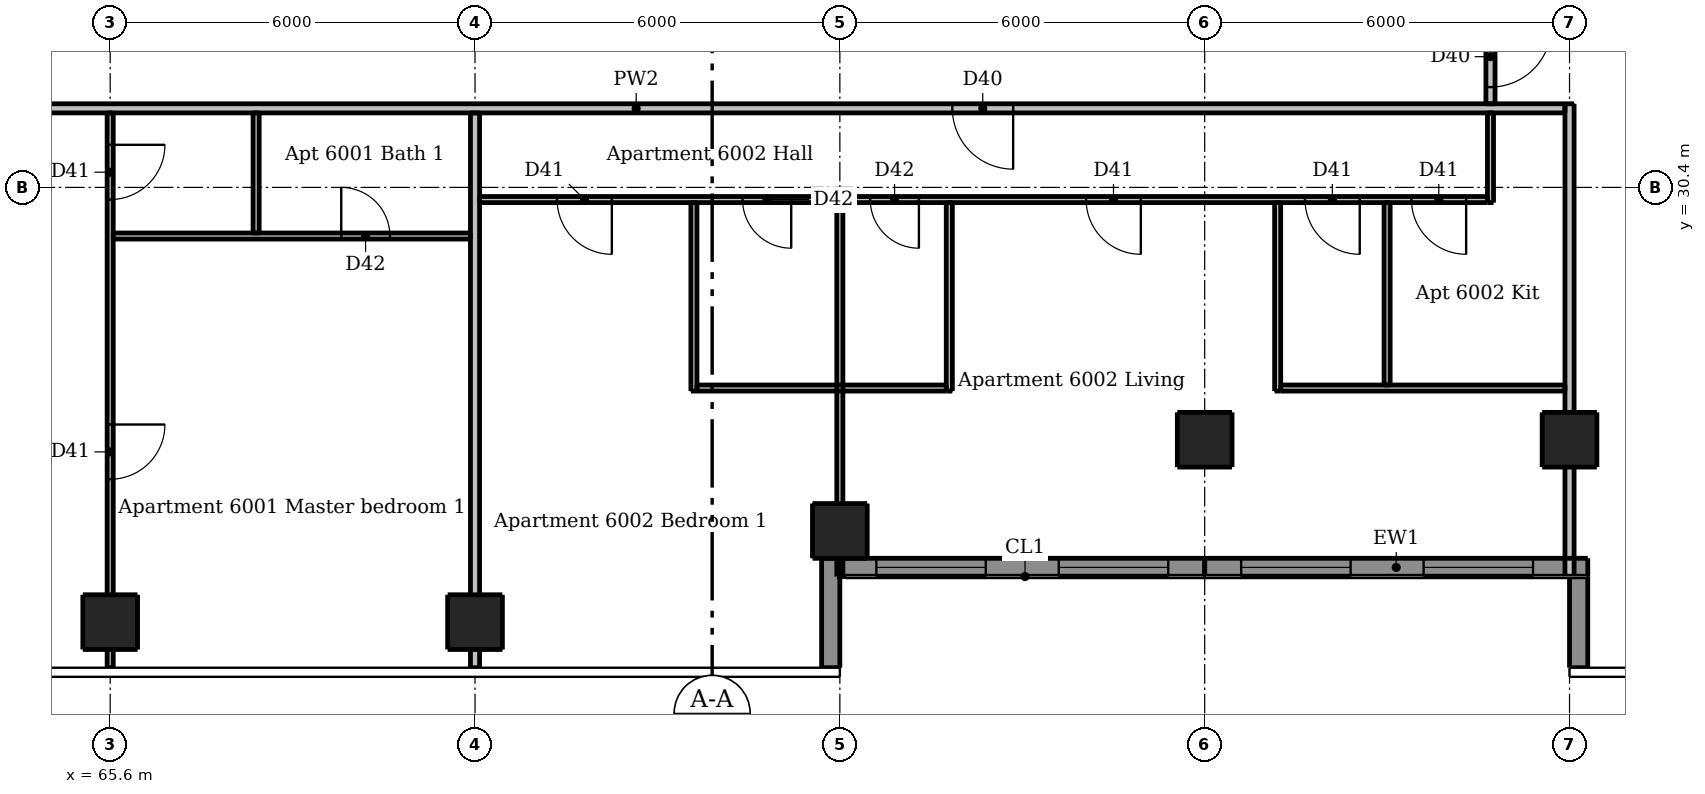
"""IFC4 building model, lengths in metres.
Left out: names, types, materials, properties, quantities, classifications, styles, units other than length and angle.
Written with IfcOpenShell. Run it as: python <this file> out.ifc"""

import sys

from ifc_helpers import new_model, si_unit, direction, frame, frame_2d, origin, origin_2d, place, context, subcontext, project, spatial, rectangle, extrude, element, fill, save


model = new_model("IFC4")
c1 = context("Model", 3, precision=1e-05, world=origin(), true_north=direction((0.0, 1.0)))
c2 = subcontext(c1, "Body", "Model", "MODEL_VIEW")
j1 = project(units=[si_unit("LENGTHUNIT", "METRE"), si_unit("PLANEANGLEUNIT", "RADIAN")], contexts=[c1])
p1 = place(None, origin())
s1 = spatial("IfcSite", under=j1, at=p1, CompositionType="ELEMENT")
p2 = place(p1, origin())
s2 = spatial("IfcBuilding", under=s1, at=p2, CompositionType="ELEMENT")
p3 = place(p2, frame((0.0, 0.0, 223.3)))
s3 = spatial("IfcBuildingStorey", under=s2, at=p3, CompositionType="ELEMENT", Elevation=223.3)
for number, where, z_axis, x_axis in (
    (1, (65.6, 23.25, 0.0), (0.0, 0.0, 1.0), (1.0, 0.0, 0.0)),
    (2, (71.6, 23.25, 0.0), (0.0, 0.0, 1.0), (1.0, 0.0, 0.0)),
    (3, (77.6, 24.75, 0.0), (0.0, 0.0, 1.0), (1.0, 0.0, 0.0)),
    (4, (83.6, 26.25, 0.0), (0.0, 0.0, 1.0), (1.0, 0.0, 0.0)),
    (5, (89.6, 26.25, 0.0), (0.0, 0.0, 1.0), (1.0, 0.0, 0.0)),
):
    element("IfcColumn", number, at=place(p3, frame(where, z_axis=z_axis, x_axis=x_axis)), inside=s3, PredefinedType="COLUMN", context=c2, shape_type="SweptSolid", body=[
        extrude(rectangle(XDim=0.9, YDim=0.9, at=origin_2d()), origin(), (0.0, 0.0, 1.0), 3.05),
    ])
p4 = place(p3, frame((77.45, 22.5, 0.0), z_axis=(0.0, 0.0, 1.0), x_axis=(0.0, 1.0, 0.0)))
e6 = element("IfcWall", 6, at=p4, inside=s3, PredefinedType="SOLIDWALL", context=c2, shape_type="SweptSolid", body=[
    extrude(rectangle(XDim=1.8, YDim=0.3, at=frame_2d((0.9, 0.0))), origin(), (0.0, 0.0, 1.0), 3.05),
])
p5 = place(p3, frame((89.75, 24.0, 0.0), z_axis=(0.0, 0.0, 1.0), x_axis=(0.0, -1.0, 0.0)))
e7 = element("IfcWall", 7, at=p5, inside=s3, PredefinedType="SOLIDWALL", context=c2, shape_type="SweptSolid", body=[
    extrude(rectangle(XDim=1.5, YDim=0.3, at=frame_2d((0.75, 0.0))), origin(), (0.0, 0.0, 1.0), 3.05),
])
p6 = place(p3, frame((77.6, 24.15, 0.0), z_axis=(0.0, 0.0, 1.0), x_axis=(1.0, 0.0, 0.0)))
e8 = element("IfcWall", 8, at=p6, inside=s3, PredefinedType="SOLIDWALL", context=c2, shape_type="SweptSolid", body=[
    extrude(rectangle(XDim=6.0, YDim=0.3, at=frame_2d((3.0, 0.0))), origin(), (0.0, 0.0, 1.0), 3.05),
])
p7 = place(p6, frame((0.6, 0.0, 0.15)))
e9 = element("IfcOpeningElement", 9, at=p7, cuts=e8, PredefinedType="OPENING", context=c2, shape_type="SweptSolid", body=[
    extrude(rectangle(XDim=1.8, YDim=2.1, at=frame_2d((0.9, 1.05))), frame((0.0, 0.16, 0.0), z_axis=(0.0, -1.0, 0.0), x_axis=(1.0, 0.0, 0.0)), (0.0, 0.0, 1.0), 0.32),
])
p8 = place(p6, frame((3.6, 0.0, 0.15)))
e10 = element("IfcOpeningElement", 10, at=p8, cuts=e8, PredefinedType="OPENING", context=c2, shape_type="SweptSolid", body=[
    extrude(rectangle(XDim=1.8, YDim=2.1, at=frame_2d((0.9, 1.05))), frame((0.0, 0.16, 0.0), z_axis=(0.0, -1.0, 0.0), x_axis=(1.0, 0.0, 0.0)), (0.0, 0.0, 1.0), 0.32),
])
p9 = place(p3, frame((83.6, 24.15, 0.0), z_axis=(0.0, 0.0, 1.0), x_axis=(1.0, 0.0, 0.0)))
e11 = element("IfcWall", 11, at=p9, inside=s3, PredefinedType="SOLIDWALL", context=c2, shape_type="SweptSolid", body=[
    extrude(rectangle(XDim=6.3, YDim=0.3, at=frame_2d((3.15, 0.0))), origin(), (0.0, 0.0, 1.0), 3.05),
])
p10 = place(p9, frame((0.6, 0.0, 0.15)))
e12 = element("IfcOpeningElement", 12, at=p10, cuts=e11, PredefinedType="OPENING", context=c2, shape_type="SweptSolid", body=[
    extrude(rectangle(XDim=1.8, YDim=2.1, at=frame_2d((0.9, 1.05))), frame((0.0, 0.16, 0.0), z_axis=(0.0, -1.0, 0.0), x_axis=(1.0, 0.0, 0.0)), (0.0, 0.0, 1.0), 0.32),
])
p11 = place(p9, frame((3.6, 0.0, 0.15)))
e13 = element("IfcOpeningElement", 13, at=p11, cuts=e11, PredefinedType="OPENING", context=c2, shape_type="SweptSolid", body=[
    extrude(rectangle(XDim=1.8, YDim=2.1, at=frame_2d((0.9, 1.05))), frame((0.0, 0.16, 0.0), z_axis=(0.0, -1.0, 0.0), x_axis=(1.0, 0.0, 0.0)), (0.0, 0.0, 1.0), 0.32),
])
p12 = place(p3, frame((65.6, 31.625, 0.0), z_axis=(0.0, 0.0, 1.0), x_axis=(0.0, -1.0, 0.0)))
e14 = element("IfcWall", 14, at=p12, inside=s3, PredefinedType="PARTITIONING", context=c2, shape_type="SweptSolid", body=[
    extrude(rectangle(XDim=9.125, YDim=0.1, at=frame_2d((4.562, 0.0))), origin(), (0.0, 0.0, 1.0), 2.516),
])
p13 = place(p12, frame((0.525, 0.0, 0.0)))
e15 = element("IfcOpeningElement", 15, at=p13, cuts=e14, PredefinedType="OPENING", context=c2, shape_type="SweptSolid", body=[
    extrude(rectangle(XDim=0.9, YDim=2.1, at=frame_2d((0.45, 1.05))), frame((0.0, 0.06, 0.0), z_axis=(0.0, -1.0, 0.0), x_axis=(1.0, 0.0, 0.0)), (0.0, 0.0, 1.0), 0.12),
])
p14 = place(p12, frame((5.125, 0.0, 0.0)))
e16 = element("IfcOpeningElement", 16, at=p14, cuts=e14, PredefinedType="OPENING", context=c2, shape_type="SweptSolid", body=[
    extrude(rectangle(XDim=0.9, YDim=2.1, at=frame_2d((0.45, 1.05))), frame((0.0, 0.06, 0.0), z_axis=(0.0, -1.0, 0.0), x_axis=(1.0, 0.0, 0.0)), (0.0, 0.0, 1.0), 0.12),
])
p15 = place(p3, frame((68.0, 29.65, 0.0), z_axis=(0.0, 0.0, 1.0), x_axis=(0.0, 1.0, 0.0)))
e17 = element("IfcWall", 17, at=p15, inside=s3, PredefinedType="PARTITIONING", context=c2, shape_type="SweptSolid", body=[
    extrude(rectangle(XDim=1.975, YDim=0.1, at=frame_2d((0.988, 0.0))), origin(), (0.0, 0.0, 1.0), 3.05),
])
p16 = place(p3, frame((75.2, 27.05, 0.0), z_axis=(0.0, 0.0, 1.0), x_axis=(0.0, 1.0, 0.0)))
e18 = element("IfcWall", 18, at=p16, inside=s3, PredefinedType="PARTITIONING", context=c2, shape_type="SweptSolid", body=[
    extrude(rectangle(XDim=3.1, YDim=0.1, at=frame_2d((1.55, 0.0))), origin(), (0.0, 0.0, 1.0), 3.05),
])
p17 = place(p3, frame((77.6, 24.0, 0.0), z_axis=(0.0, 0.0, 1.0), x_axis=(0.0, 1.0, 0.0)))
e19 = element("IfcWall", 19, at=p17, inside=s3, PredefinedType="PARTITIONING", context=c2, shape_type="SweptSolid", body=[
    extrude(rectangle(XDim=6.15, YDim=0.1, at=frame_2d((3.075, 0.0))), origin(), (0.0, 0.0, 1.0), 2.59),
])
for number, where, z_axis, x_axis in (
    (20, (79.4, 27.05, 0.0), (0.0, 0.0, 1.0), (0.0, 1.0, 0.0)),
    (21, (84.8, 27.05, 0.0), (0.0, 0.0, 1.0), (0.0, 1.0, 0.0)),
):
    element("IfcWall", number, at=place(p3, frame(where, z_axis=z_axis, x_axis=x_axis)), inside=s3, PredefinedType="PARTITIONING", context=c2, shape_type="SweptSolid", body=[
        extrude(rectangle(XDim=3.1, YDim=0.1, at=frame_2d((1.55, 0.0))), origin(), (0.0, 0.0, 1.0), 3.05),
    ])
p18 = place(p3, frame((86.6, 27.15, 0.0), z_axis=(0.0, 0.0, 1.0), x_axis=(0.0, 1.0, 0.0)))
e22 = element("IfcWall", 22, at=p18, inside=s3, PredefinedType="PARTITIONING", context=c2, shape_type="SweptSolid", body=[
    extrude(rectangle(XDim=3.0, YDim=0.1, at=frame_2d((1.5, 0.0))), origin(), (0.0, 0.0, 1.0), 3.05),
])
p19 = place(p3, frame((88.3, 30.15, 0.0), z_axis=(0.0, 0.0, 1.0), x_axis=(0.0, 1.0, 0.0)))
e23 = element("IfcWall", 23, at=p19, inside=s3, PredefinedType="PARTITIONING", context=c2, shape_type="SweptSolid", body=[
    extrude(rectangle(XDim=1.475, YDim=0.1, at=frame_2d((0.738, 0.0))), origin(), (0.0, 0.0, 1.0), 3.05),
])
p20 = place(p3, frame((88.25, 30.2, 0.0), z_axis=(0.0, 0.0, 1.0), x_axis=(-1.0, 0.0, 0.0)))
e24 = element("IfcWall", 24, at=p20, inside=s3, PredefinedType="PARTITIONING", context=c2, shape_type="SweptSolid", body=[
    extrude(rectangle(XDim=16.575, YDim=0.1, at=frame_2d((8.288, 0.0))), origin(), (0.0, 0.0, 1.0), 3.05),
])
p21 = place(p20, frame((5.7, 0.0, 0.0)))
e25 = element("IfcOpeningElement", 25, at=p21, cuts=e24, PredefinedType="OPENING", context=c2, shape_type="SweptSolid", body=[
    extrude(rectangle(XDim=0.9, YDim=2.1, at=frame_2d((0.45, 1.05))), frame((0.0, 0.06, 0.0), z_axis=(0.0, -1.0, 0.0), x_axis=(1.0, 0.0, 0.0)), (0.0, 0.0, 1.0), 0.12),
])
p22 = place(p20, frame((0.35, 0.0, 0.0)))
e26 = element("IfcOpeningElement", 26, at=p22, cuts=e24, PredefinedType="OPENING", context=c2, shape_type="SweptSolid", body=[
    extrude(rectangle(XDim=0.9, YDim=2.1, at=frame_2d((0.45, 1.05))), frame((0.0, 0.06, 0.0), z_axis=(0.0, -1.0, 0.0), x_axis=(1.0, 0.0, 0.0)), (0.0, 0.0, 1.0), 0.12),
])
p23 = place(p20, frame((2.1, 0.0, 0.0)))
e27 = element("IfcOpeningElement", 27, at=p23, cuts=e24, PredefinedType="OPENING", context=c2, shape_type="SweptSolid", body=[
    extrude(rectangle(XDim=0.9, YDim=2.1, at=frame_2d((0.45, 1.05))), frame((0.0, 0.06, 0.0), z_axis=(0.0, -1.0, 0.0), x_axis=(1.0, 0.0, 0.0)), (0.0, 0.0, 1.0), 0.12),
])
p24 = place(p20, frame((9.35, 0.0, 0.0)))
e28 = element("IfcOpeningElement", 28, at=p24, cuts=e24, PredefinedType="OPENING", context=c2, shape_type="SweptSolid", body=[
    extrude(rectangle(XDim=0.8, YDim=2.1, at=frame_2d((0.4, 1.05))), frame((0.0, 0.06, 0.0), z_axis=(0.0, -1.0, 0.0), x_axis=(1.0, 0.0, 0.0)), (0.0, 0.0, 1.0), 0.12),
])
p25 = place(p20, frame((14.4, 0.0, 0.0)))
e29 = element("IfcOpeningElement", 29, at=p25, cuts=e24, PredefinedType="OPENING", context=c2, shape_type="SweptSolid", body=[
    extrude(rectangle(XDim=0.9, YDim=2.1, at=frame_2d((0.45, 1.05))), frame((0.0, 0.06, 0.0), z_axis=(0.0, -1.0, 0.0), x_axis=(1.0, 0.0, 0.0)), (0.0, 0.0, 1.0), 0.12),
])
p26 = place(p20, frame((11.45, 0.0, 0.0)))
e30 = element("IfcOpeningElement", 30, at=p26, cuts=e24, PredefinedType="OPENING", context=c2, shape_type="SweptSolid", body=[
    extrude(rectangle(XDim=0.8, YDim=2.1, at=frame_2d((0.4, 1.05))), frame((0.0, 0.06, 0.0), z_axis=(0.0, -1.0, 0.0), x_axis=(1.0, 0.0, 0.0)), (0.0, 0.0, 1.0), 0.12),
])
p27 = place(p3, frame((65.65, 29.6, 0.0), z_axis=(0.0, 0.0, 1.0), x_axis=(1.0, 0.0, 0.0)))
e31 = element("IfcWall", 31, at=p27, inside=s3, PredefinedType="PARTITIONING", context=c2, shape_type="SweptSolid", body=[
    extrude(rectangle(XDim=5.875, YDim=0.1, at=frame_2d((2.938, 0.0))), origin(), (0.0, 0.0, 1.0), 3.05),
])
p28 = place(p27, frame((3.75, 0.0, 0.0)))
e32 = element("IfcOpeningElement", 32, at=p28, cuts=e31, PredefinedType="OPENING", context=c2, shape_type="SweptSolid", body=[
    extrude(rectangle(XDim=0.8, YDim=2.1, at=frame_2d((0.4, 1.05))), frame((0.0, 0.06, 0.0), z_axis=(0.0, -1.0, 0.0), x_axis=(1.0, 0.0, 0.0)), (0.0, 0.0, 1.0), 0.12),
])
p29 = place(p3, frame((75.25, 27.1, 0.0), z_axis=(0.0, 0.0, 1.0), x_axis=(1.0, 0.0, 0.0)))
e33 = element("IfcWall", 33, at=p29, inside=s3, PredefinedType="PARTITIONING", context=c2, shape_type="SweptSolid", body=[
    extrude(rectangle(XDim=4.1, YDim=0.1, at=frame_2d((2.05, 0.0))), origin(), (0.0, 0.0, 1.0), 3.05),
])
p30 = place(p3, frame((84.85, 27.1, 0.0), z_axis=(0.0, 0.0, 1.0), x_axis=(1.0, 0.0, 0.0)))
e34 = element("IfcWall", 34, at=p30, inside=s3, PredefinedType="PARTITIONING", context=c2, shape_type="SweptSolid", body=[
    extrude(rectangle(XDim=4.675, YDim=0.1, at=frame_2d((2.337, 0.0))), origin(), (0.0, 0.0, 1.0), 3.05),
])
p31 = place(p3, frame((71.6, 22.5, 0.0), z_axis=(0.0, 0.0, 1.0), x_axis=(0.0, 1.0, 0.0)))
e35 = element("IfcWall", 35, at=p31, inside=s3, PredefinedType="PARTITIONING", context=c2, shape_type="SweptSolid", body=[
    extrude(rectangle(XDim=9.125, YDim=0.15, at=frame_2d((4.562, 0.0))), origin(), (0.0, 0.0, 1.0), 2.516),
])
p32 = place(p3, frame((88.3, 61.175, 0.0), z_axis=(0.0, 0.0, 1.0), x_axis=(0.0, -1.0, 0.0)))
e36 = element("IfcWall", 36, at=p32, inside=s3, PredefinedType="PARTITIONING", context=c2, shape_type="SweptSolid", body=[
    extrude(rectangle(XDim=29.4, YDim=0.15, at=frame_2d((14.7, 0.0))), origin(), (0.0, 0.0, 1.0), 3.05),
])
p33 = place(p32, frame((28.125, 0.0, 0.0)))
e37 = element("IfcOpeningElement", 37, at=p33, cuts=e36, PredefinedType="OPENING", context=c2, shape_type="SweptSolid", body=[
    extrude(rectangle(XDim=1.0, YDim=2.1, at=frame_2d((0.5, 1.05))), frame((0.0, 0.085, 0.0), z_axis=(0.0, -1.0, 0.0), x_axis=(1.0, 0.0, 0.0)), (0.0, 0.0, 1.0), 0.17),
])
p34 = place(p32, frame((10.775, 0.0, 0.0)))
e38 = element("IfcOpeningElement", 38, at=p34, cuts=e36, PredefinedType="OPENING", context=c2, shape_type="SweptSolid", body=[
    extrude(rectangle(XDim=1.0, YDim=2.1, at=frame_2d((0.5, 1.05))), frame((0.0, 0.085, 0.0), z_axis=(0.0, -1.0, 0.0), x_axis=(1.0, 0.0, 0.0)), (0.0, 0.0, 1.0), 0.17),
])
p35 = place(p3, frame((89.6, 24.0, 0.0), z_axis=(0.0, 0.0, 1.0), x_axis=(0.0, 1.0, 0.0)))
e39 = element("IfcWall", 39, at=p35, inside=s3, PredefinedType="PARTITIONING", context=c2, shape_type="SweptSolid", body=[
    extrude(rectangle(XDim=7.775, YDim=0.15, at=frame_2d((3.887, 0.0))), origin(), (0.0, 0.0, 1.0), 2.516),
])
p36 = place(p3, frame((89.525, 31.7, 0.0), z_axis=(0.0, 0.0, 1.0), x_axis=(-1.0, 0.0, 0.0)))
e40 = element("IfcWall", 40, at=p36, inside=s3, PredefinedType="PARTITIONING", context=c2, shape_type="SweptSolid", body=[
    extrude(rectangle(XDim=30.55, YDim=0.15, at=frame_2d((15.275, 0.0))), origin(), (0.0, 0.0, 1.0), 3.05),
])
p37 = place(p36, frame((26.775, 0.0, 0.0)))
e41 = element("IfcOpeningElement", 41, at=p37, cuts=e40, PredefinedType="OPENING", context=c2, shape_type="SweptSolid", body=[
    extrude(rectangle(XDim=1.0, YDim=2.1, at=frame_2d((0.5, 1.05))), frame((0.0, 0.085, 0.0), z_axis=(0.0, -1.0, 0.0), x_axis=(1.0, 0.0, 0.0)), (0.0, 0.0, 1.0), 0.17),
])
p38 = place(p36, frame((9.075, 0.0, 0.0)))
e42 = element("IfcOpeningElement", 42, at=p38, cuts=e40, PredefinedType="OPENING", context=c2, shape_type="SweptSolid", body=[
    extrude(rectangle(XDim=1.0, YDim=2.1, at=frame_2d((0.5, 1.05))), frame((0.0, 0.085, 0.0), z_axis=(0.0, -1.0, 0.0), x_axis=(1.0, 0.0, 0.0)), (0.0, 0.0, 1.0), 0.17),
])
p39 = place(p7, origin())
e43 = element("IfcWindow", 43, at=p39, inside=s3, PartitioningType="DOUBLE_PANEL_VERTICAL", PredefinedType="WINDOW", context=c2, shape_type="SweptSolid", body=[
    extrude(rectangle(XDim=1.8, YDim=2.1, at=frame_2d((0.9, 1.05))), frame((0.0, 0.03, 0.0), z_axis=(0.0, -1.0, 0.0), x_axis=(1.0, 0.0, 0.0)), (0.0, 0.0, 1.0), 0.06),
])
fill(e9, e43)
p40 = place(p8, origin())
e44 = element("IfcWindow", 44, at=p40, inside=s3, PartitioningType="DOUBLE_PANEL_VERTICAL", PredefinedType="WINDOW", context=c2, shape_type="SweptSolid", body=[
    extrude(rectangle(XDim=1.8, YDim=2.1, at=frame_2d((0.9, 1.05))), frame((0.0, 0.03, 0.0), z_axis=(0.0, -1.0, 0.0), x_axis=(1.0, 0.0, 0.0)), (0.0, 0.0, 1.0), 0.06),
])
fill(e10, e44)
p41 = place(p10, origin())
e45 = element("IfcWindow", 45, at=p41, inside=s3, PartitioningType="DOUBLE_PANEL_VERTICAL", PredefinedType="WINDOW", context=c2, shape_type="SweptSolid", body=[
    extrude(rectangle(XDim=1.8, YDim=2.1, at=frame_2d((0.9, 1.05))), frame((0.0, 0.03, 0.0), z_axis=(0.0, -1.0, 0.0), x_axis=(1.0, 0.0, 0.0)), (0.0, 0.0, 1.0), 0.06),
])
fill(e12, e45)
p42 = place(p11, origin())
e46 = element("IfcWindow", 46, at=p42, inside=s3, PartitioningType="DOUBLE_PANEL_VERTICAL", PredefinedType="WINDOW", context=c2, shape_type="SweptSolid", body=[
    extrude(rectangle(XDim=1.8, YDim=2.1, at=frame_2d((0.9, 1.05))), frame((0.0, 0.03, 0.0), z_axis=(0.0, -1.0, 0.0), x_axis=(1.0, 0.0, 0.0)), (0.0, 0.0, 1.0), 0.06),
])
fill(e13, e46)
p43 = place(p13, origin())
e47 = element("IfcDoor", 47, at=p43, inside=s3, OperationType="SINGLE_SWING_LEFT", PredefinedType="DOOR", context=c2, shape_type="SweptSolid", body=[
    extrude(rectangle(XDim=0.9, YDim=2.1, at=frame_2d((0.45, 1.05))), frame((0.0, 0.025, 0.0), z_axis=(0.0, -1.0, 0.0), x_axis=(1.0, 0.0, 0.0)), (0.0, 0.0, 1.0), 0.05),
])
fill(e15, e47)
p44 = place(p14, origin())
e48 = element("IfcDoor", 48, at=p44, inside=s3, OperationType="SINGLE_SWING_LEFT", PredefinedType="DOOR", context=c2, shape_type="SweptSolid", body=[
    extrude(rectangle(XDim=0.9, YDim=2.1, at=frame_2d((0.45, 1.05))), frame((0.0, 0.025, 0.0), z_axis=(0.0, -1.0, 0.0), x_axis=(1.0, 0.0, 0.0)), (0.0, 0.0, 1.0), 0.05),
])
fill(e16, e48)
p45 = place(p28, origin())
e49 = element("IfcDoor", 49, at=p45, inside=s3, OperationType="SINGLE_SWING_LEFT", PredefinedType="DOOR", context=c2, shape_type="SweptSolid", body=[
    extrude(rectangle(XDim=0.8, YDim=2.1, at=frame_2d((0.4, 1.05))), frame((0.0, 0.025, 0.0), z_axis=(0.0, -1.0, 0.0), x_axis=(1.0, 0.0, 0.0)), (0.0, 0.0, 1.0), 0.05),
])
fill(e32, e49)
p46 = place(p38, origin())
e50 = element("IfcDoor", 50, at=p46, inside=s3, OperationType="SINGLE_SWING_LEFT", PredefinedType="DOOR", context=c2, shape_type="SweptSolid", body=[
    extrude(rectangle(XDim=1.0, YDim=2.1, at=frame_2d((0.5, 1.05))), frame((0.0, 0.025, 0.0), z_axis=(0.0, -1.0, 0.0), x_axis=(1.0, 0.0, 0.0)), (0.0, 0.0, 1.0), 0.05),
])
fill(e42, e50)
p47 = place(p21, origin())
e51 = element("IfcDoor", 51, at=p47, inside=s3, OperationType="SINGLE_SWING_LEFT", PredefinedType="DOOR", context=c2, shape_type="SweptSolid", body=[
    extrude(rectangle(XDim=0.9, YDim=2.1, at=frame_2d((0.45, 1.05))), frame((0.0, 0.025, 0.0), z_axis=(0.0, -1.0, 0.0), x_axis=(1.0, 0.0, 0.0)), (0.0, 0.0, 1.0), 0.05),
])
fill(e25, e51)
p48 = place(p22, origin())
e52 = element("IfcDoor", 52, at=p48, inside=s3, OperationType="SINGLE_SWING_LEFT", PredefinedType="DOOR", context=c2, shape_type="SweptSolid", body=[
    extrude(rectangle(XDim=0.9, YDim=2.1, at=frame_2d((0.45, 1.05))), frame((0.0, 0.025, 0.0), z_axis=(0.0, -1.0, 0.0), x_axis=(1.0, 0.0, 0.0)), (0.0, 0.0, 1.0), 0.05),
])
fill(e26, e52)
p49 = place(p23, origin())
e53 = element("IfcDoor", 53, at=p49, inside=s3, OperationType="SINGLE_SWING_LEFT", PredefinedType="DOOR", context=c2, shape_type="SweptSolid", body=[
    extrude(rectangle(XDim=0.9, YDim=2.1, at=frame_2d((0.45, 1.05))), frame((0.0, 0.025, 0.0), z_axis=(0.0, -1.0, 0.0), x_axis=(1.0, 0.0, 0.0)), (0.0, 0.0, 1.0), 0.05),
])
fill(e27, e53)
p50 = place(p24, origin())
e54 = element("IfcDoor", 54, at=p50, inside=s3, OperationType="SINGLE_SWING_LEFT", PredefinedType="DOOR", context=c2, shape_type="SweptSolid", body=[
    extrude(rectangle(XDim=0.8, YDim=2.1, at=frame_2d((0.4, 1.05))), frame((0.0, 0.025, 0.0), z_axis=(0.0, -1.0, 0.0), x_axis=(1.0, 0.0, 0.0)), (0.0, 0.0, 1.0), 0.05),
])
fill(e28, e54)
p51 = place(p25, origin())
e55 = element("IfcDoor", 55, at=p51, inside=s3, OperationType="SINGLE_SWING_LEFT", PredefinedType="DOOR", context=c2, shape_type="SweptSolid", body=[
    extrude(rectangle(XDim=0.9, YDim=2.1, at=frame_2d((0.45, 1.05))), frame((0.0, 0.025, 0.0), z_axis=(0.0, -1.0, 0.0), x_axis=(1.0, 0.0, 0.0)), (0.0, 0.0, 1.0), 0.05),
])
fill(e29, e55)
p52 = place(p26, origin())
e56 = element("IfcDoor", 56, at=p52, inside=s3, OperationType="SINGLE_SWING_LEFT", PredefinedType="DOOR", context=c2, shape_type="SweptSolid", body=[
    extrude(rectangle(XDim=0.8, YDim=2.1, at=frame_2d((0.4, 1.05))), frame((0.0, 0.025, 0.0), z_axis=(0.0, -1.0, 0.0), x_axis=(1.0, 0.0, 0.0)), (0.0, 0.0, 1.0), 0.05),
])
fill(e30, e56)
p53 = place(p33, origin())
e57 = element("IfcDoor", 57, at=p53, inside=s3, OperationType="SINGLE_SWING_LEFT", PredefinedType="DOOR", context=c2, shape_type="SweptSolid", body=[
    extrude(rectangle(XDim=1.0, YDim=2.1, at=frame_2d((0.5, 1.05))), frame((0.0, 0.025, 0.0), z_axis=(0.0, -1.0, 0.0), x_axis=(1.0, 0.0, 0.0)), (0.0, 0.0, 1.0), 0.05),
])
fill(e37, e57)
save(model, sys.argv[1])
